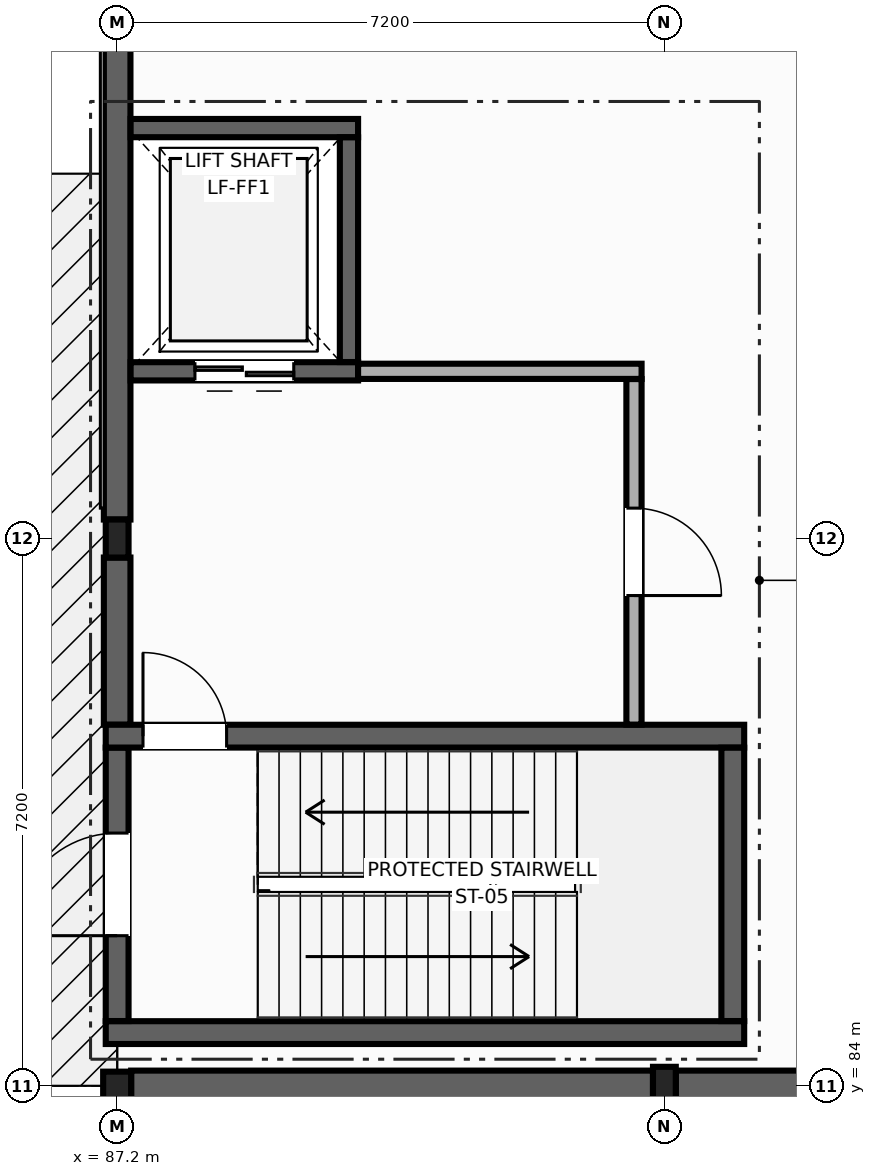
"""IFC4 building model, lengths in metres.
Left out: names, types, materials, properties, quantities, classifications, styles, units other than length and angle.
Written with IfcOpenShell. Run it as: python <this file> out.ifc"""

import sys

from ifc_helpers import new_model, si_unit, direction, frame, frame_2d, origin, origin_2d, place, context, subcontext, project, spatial, rectangle, i_section, extrude, element, fill, save


model = new_model("IFC4")
c1 = context("Model", 3, precision=1e-05, world=origin(), true_north=direction((0.0, 1.0)))
c2 = subcontext(c1, "Body", "Model", "MODEL_VIEW")
j1 = project(units=[si_unit("LENGTHUNIT", "METRE"), si_unit("PLANEANGLEUNIT", "RADIAN")], contexts=[c1])
p1 = place(None, origin())
s1 = spatial("IfcSite", under=j1, at=p1, CompositionType="ELEMENT")
p2 = place(p1, origin())
s2 = spatial("IfcBuilding", under=s1, at=p2, CompositionType="ELEMENT")
p3 = place(p2, origin())
s3 = spatial("IfcBuildingStorey", under=s2, at=p3, CompositionType="ELEMENT", Elevation=0.0)
p4 = place(p3, frame((87.2, 84.0, 0.0), z_axis=(0.0, 0.0, 1.0), x_axis=(0.0, 1.0, 0.0)))
e1 = element("IfcColumn", 1, at=p4, inside=s3, PredefinedType="COLUMN", context=c2, shape_type="SweptSolid", body=[
    extrude(i_section(OverallWidth=0.373, OverallDepth=0.368, WebThickness=0.014, FlangeThickness=0.024, at=origin_2d()), origin(), (0.0, 0.0, 1.0), 5.4),
])
for number, where, z_axis, x_axis in (
    (2, (94.4, 84.0, 0.0), (0.0, 0.0, 1.0), (1.0, 0.0, 0.0)),
    (3, (87.2, 91.2, 0.0), (0.0, 0.0, 1.0), (1.0, 0.0, 0.0)),
):
    element("IfcColumn", number, at=place(p3, frame(where, z_axis=z_axis, x_axis=x_axis)), inside=s3, PredefinedType="COLUMN", context=c2, shape_type="SweptSolid", body=[
        extrude(i_section(OverallWidth=0.3, OverallDepth=0.5, WebThickness=0.014, FlangeThickness=0.028, at=origin_2d()), origin(), (0.0, 0.0, 1.0), 5.4),
    ])
p5 = place(p3, frame((87.2, 88.75, 0.0), z_axis=(0.0, 0.0, 1.0), x_axis=(0.0, 1.0, 0.0)))
e4 = element("IfcWall", 4, at=p5, inside=s3, PredefinedType="SOLIDWALL", context=c2, shape_type="SweptSolid", body=[
    extrude(rectangle(XDim=2.2, YDim=0.35, at=frame_2d((1.1, 0.0))), origin(), (0.0, 0.0, 1.0), 5.15),
])
p6 = place(p3, frame((87.2, 91.45, 0.0), z_axis=(0.0, 0.0, 1.0), x_axis=(0.0, 1.0, 0.0)))
e5 = element("IfcWall", 5, at=p6, inside=s3, PredefinedType="SOLIDWALL", context=c2, shape_type="SweptSolid", body=[
    extrude(rectangle(XDim=6.8, YDim=0.35, at=frame_2d((3.4, 0.0))), origin(), (0.0, 0.0, 1.0), 5.15),
])
p7 = place(p3, frame((95.45, 84.7, 0.0), z_axis=(0.0, 0.0, 1.0), x_axis=(-1.0, 0.0, 0.0)))
e6 = element("IfcWall", 6, at=p7, inside=s3, PredefinedType="SHEAR", context=c2, shape_type="SweptSolid", body=[
    extrude(rectangle(XDim=8.4, YDim=0.3, at=frame_2d((4.2, 0.0))), origin(), (0.0, 0.0, 1.0), 5.15),
])
p8 = place(p3, frame((87.2, 84.852, 0.0), z_axis=(0.0, 0.0, 1.0), x_axis=(0.0, 1.0, 0.0)))
e7 = element("IfcWall", 7, at=p8, inside=s3, PredefinedType="SHEAR", context=c2, shape_type="SweptSolid", body=[
    extrude(rectangle(XDim=3.598, YDim=0.3, at=frame_2d((1.799, 0.0))), origin(), (0.0, 0.0, 1.0), 5.15),
])
p9 = place(p8, frame((1.123, 0.0, 0.0)))
e8 = element("IfcOpeningElement", 8, at=p9, cuts=e7, PredefinedType="OPENING", context=c2, shape_type="SweptSolid", body=[
    extrude(rectangle(XDim=1.35, YDim=2.2, at=frame_2d((0.675, 1.1))), frame((0.0, 0.16, 0.0), z_axis=(0.0, -1.0, 0.0), x_axis=(1.0, 0.0, 0.0)), (0.0, 0.0, 1.0), 0.32),
])
p10 = place(p3, frame((87.05, 88.6, 0.0), z_axis=(0.0, 0.0, 1.0), x_axis=(1.0, 0.0, 0.0)))
e9 = element("IfcWall", 9, at=p10, inside=s3, PredefinedType="SHEAR", context=c2, shape_type="SweptSolid", body=[
    extrude(rectangle(XDim=8.4, YDim=0.3, at=frame_2d((4.2, 0.0))), origin(), (0.0, 0.0, 1.0), 5.15),
])
p11 = place(p10, frame((0.49, 0.0, 0.0)))
e10 = element("IfcOpeningElement", 10, at=p11, cuts=e9, PredefinedType="OPENING", context=c2, shape_type="SweptSolid", body=[
    extrude(rectangle(XDim=1.1, YDim=2.15, at=frame_2d((0.55, 1.075))), frame((0.0, 0.16, 0.0), z_axis=(0.0, -1.0, 0.0), x_axis=(1.0, 0.0, 0.0)), (0.0, 0.0, 1.0), 0.32),
])
p12 = place(p3, frame((95.3, 88.448, 0.0), z_axis=(0.0, 0.0, 1.0), x_axis=(0.0, -1.0, 0.0)))
e11 = element("IfcWall", 11, at=p12, inside=s3, PredefinedType="SHEAR", context=c2, shape_type="SweptSolid", body=[
    extrude(rectangle(XDim=3.596, YDim=0.3, at=frame_2d((1.798, 0.0))), origin(), (0.0, 0.0, 1.0), 5.15),
])
p13 = place(p3, frame((90.37, 93.4, 0.0), z_axis=(0.0, 0.0, 1.0), x_axis=(-1.0, 0.0, 0.0)))
e12 = element("IfcWall", 12, at=p13, inside=s3, PredefinedType="SHEAR", context=c2, shape_type="SweptSolid", body=[
    extrude(rectangle(XDim=2.993, YDim=0.24, at=frame_2d((1.497, 0.0))), origin(), (0.0, 0.0, 1.0), 5.15),
])
p14 = place(p13, frame((0.846, 0.0, 0.0)))
e13 = element("IfcOpeningElement", 13, at=p14, cuts=e12, PredefinedType="OPENING", context=c2, shape_type="SweptSolid", body=[
    extrude(rectangle(XDim=1.3, YDim=2.15, at=frame_2d((0.65, 1.075))), frame((0.0, 0.13, 0.0), z_axis=(0.0, -1.0, 0.0), x_axis=(1.0, 0.0, 0.0)), (0.0, 0.0, 1.0), 0.26),
])
p15 = place(p3, frame((87.377, 96.6, 0.0), z_axis=(0.0, 0.0, 1.0), x_axis=(1.0, 0.0, 0.0)))
e14 = element("IfcWall", 14, at=p15, inside=s3, PredefinedType="SHEAR", context=c2, shape_type="SweptSolid", body=[
    extrude(rectangle(XDim=2.993, YDim=0.24, at=frame_2d((1.497, 0.0))), origin(), (0.0, 0.0, 1.0), 5.15),
])
p16 = place(p3, frame((90.25, 96.478, 0.0), z_axis=(0.0, 0.0, 1.0), x_axis=(0.0, -1.0, 0.0)))
e15 = element("IfcWall", 15, at=p16, inside=s3, PredefinedType="SHEAR", context=c2, shape_type="SweptSolid", body=[
    extrude(rectangle(XDim=2.956, YDim=0.24, at=frame_2d((1.478, 0.0))), origin(), (0.0, 0.0, 1.0), 5.15),
])
p17 = place(p3, frame((90.37, 93.4, 0.0), z_axis=(0.0, 0.0, 1.0), x_axis=(1.0, 0.0, 0.0)))
e16 = element("IfcWall", 16, at=p17, inside=s3, PredefinedType="PARTITIONING", context=c2, shape_type="SweptSolid", body=[
    extrude(rectangle(XDim=3.73, YDim=0.2, at=frame_2d((1.865, 0.0))), origin(), (0.0, 0.0, 1.0), 5.15),
])
p18 = place(p3, frame((94.0, 93.298, 0.0), z_axis=(0.0, 0.0, 1.0), x_axis=(0.0, -1.0, 0.0)))
e17 = element("IfcWall", 17, at=p18, inside=s3, PredefinedType="PARTITIONING", context=c2, shape_type="SweptSolid", body=[
    extrude(rectangle(XDim=4.546, YDim=0.2, at=frame_2d((2.273, 0.0))), origin(), (0.0, 0.0, 1.0), 5.15),
])
p19 = place(p18, frame((1.698, 0.0, 0.0)))
e18 = element("IfcOpeningElement", 18, at=p19, cuts=e17, PredefinedType="OPENING", context=c2, shape_type="SweptSolid", body=[
    extrude(rectangle(XDim=1.15, YDim=2.15, at=frame_2d((0.575, 1.075))), frame((0.0, 0.11, 0.0), z_axis=(0.0, -1.0, 0.0), x_axis=(1.0, 0.0, 0.0)), (0.0, 0.0, 1.0), 0.22),
])
p20 = place(p3, frame((87.384, 84.0, 0.0), z_axis=(0.0, 0.0, 1.0), x_axis=(1.0, 0.0, 0.0)))
e19 = element("IfcWall", 19, at=p20, inside=s3, PredefinedType="SHEAR", context=c2, shape_type="SweptSolid", body=[
    extrude(rectangle(XDim=6.866, YDim=0.4, at=frame_2d((3.433, 0.0))), origin(), (0.0, 0.0, 1.0), 5.1),
])
p21 = place(p3, frame((94.55, 84.0, 0.0), z_axis=(0.0, 0.0, 1.0), x_axis=(1.0, 0.0, 0.0)))
e20 = element("IfcWall", 20, at=p21, inside=s3, PredefinedType="SHEAR", context=c2, shape_type="SweptSolid", body=[
    extrude(rectangle(XDim=6.8, YDim=0.4, at=frame_2d((3.4, 0.0))), origin(), (0.0, 0.0, 1.0), 5.15),
])
p22 = place(p9, origin())
e21 = element("IfcDoor", 21, at=p22, inside=s3, OperationType="SINGLE_SWING_LEFT", PredefinedType="DOOR", context=c2, shape_type="SweptSolid", body=[
    extrude(rectangle(XDim=1.35, YDim=2.2, at=frame_2d((0.675, 1.1))), frame((0.0, 0.025, 0.0), z_axis=(0.0, -1.0, 0.0), x_axis=(1.0, 0.0, 0.0)), (0.0, 0.0, 1.0), 0.05),
])
fill(e8, e21)
p23 = place(p11, origin())
e22 = element("IfcDoor", 22, at=p23, inside=s3, OperationType="SINGLE_SWING_LEFT", PredefinedType="DOOR", context=c2, shape_type="SweptSolid", body=[
    extrude(rectangle(XDim=1.1, YDim=2.15, at=frame_2d((0.55, 1.075))), frame((0.0, 0.025, 0.0), z_axis=(0.0, -1.0, 0.0), x_axis=(1.0, 0.0, 0.0)), (0.0, 0.0, 1.0), 0.05),
])
fill(e10, e22)
p24 = place(p14, origin())
e23 = element("IfcDoor", 23, at=p24, inside=s3, OperationType="DOUBLE_DOOR_SLIDING", PredefinedType="DOOR", context=c2, shape_type="SweptSolid", body=[
    extrude(rectangle(XDim=1.3, YDim=2.15, at=frame_2d((0.65, 1.075))), frame((0.0, 0.025, 0.0), z_axis=(0.0, -1.0, 0.0), x_axis=(1.0, 0.0, 0.0)), (0.0, 0.0, 1.0), 0.05),
])
fill(e13, e23)
p25 = place(p19, origin())
e24 = element("IfcDoor", 24, at=p25, inside=s3, OperationType="SINGLE_SWING_RIGHT", PredefinedType="DOOR", context=c2, shape_type="SweptSolid", body=[
    extrude(rectangle(XDim=1.15, YDim=2.15, at=frame_2d((0.575, 1.075))), frame((0.0, 0.025, 0.0), z_axis=(0.0, -1.0, 0.0), x_axis=(1.0, 0.0, 0.0)), (0.0, 0.0, 1.0), 0.05),
])
fill(e18, e24)
save(model, sys.argv[1])
